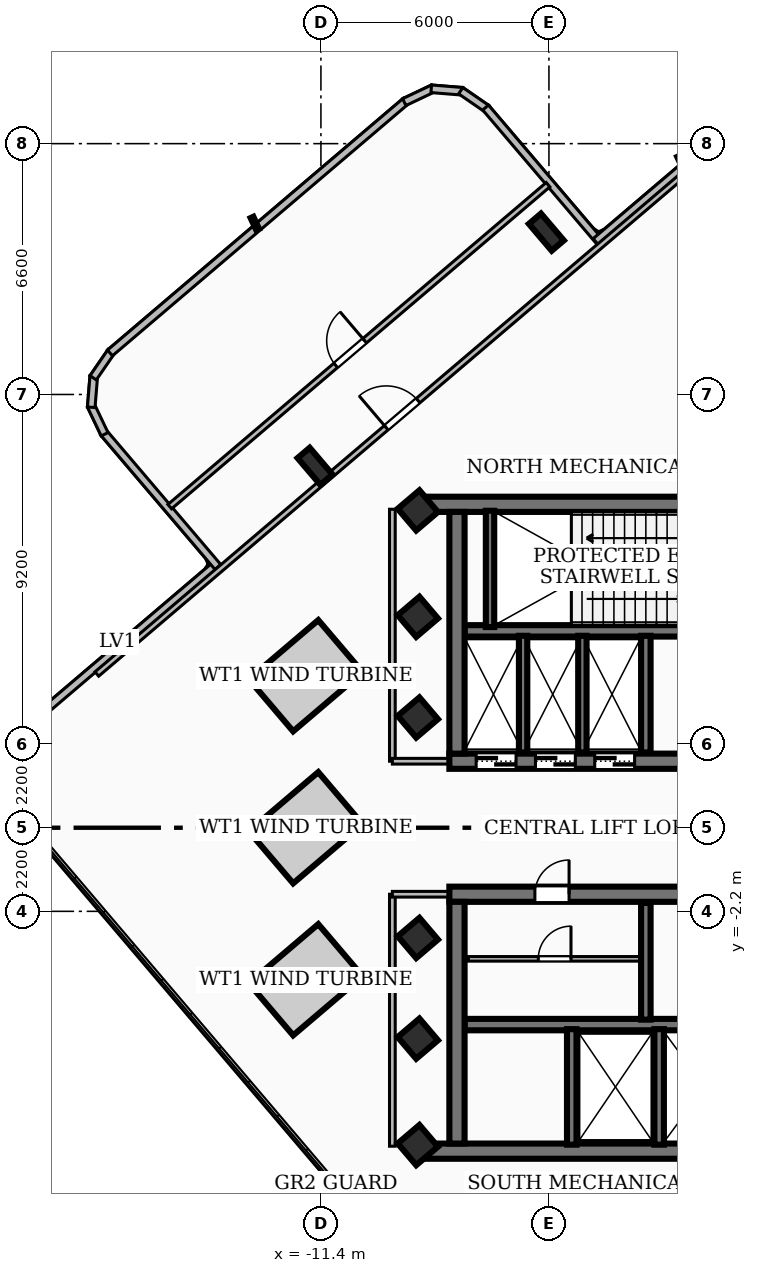
"""IFC4 building model, lengths in metres.
Left out: names, types, materials, properties, quantities, classifications, styles, units other than length and angle.
Written with IfcOpenShell. Run it as: python <this file> out.ifc"""

import sys

from ifc_helpers import new_model, si_unit, direction, frame, frame_2d, origin, origin_2d, place, context, subcontext, project, spatial, rectangle, hollow_rectangle, i_section, extrude, element, fill, save


model = new_model("IFC4")
c1 = context("Model", 3, precision=1e-05, world=origin(), true_north=direction((0.0, 1.0)))
c2 = subcontext(c1, "Body", "Model", "MODEL_VIEW")
j1 = project(units=[si_unit("LENGTHUNIT", "METRE"), si_unit("PLANEANGLEUNIT", "RADIAN")], contexts=[c1])
p1 = place(None, origin())
s1 = spatial("IfcSite", under=j1, at=p1, CompositionType="ELEMENT")
p2 = place(p1, origin())
s2 = spatial("IfcBuilding", under=s1, at=p2, CompositionType="ELEMENT")
p3 = place(p2, frame((0.0, 0.0, 239.4)))
s3 = spatial("IfcBuildingStorey", under=s2, at=p3, CompositionType="ELEMENT", Elevation=239.4)
p4 = place(p3, frame((-8.78, 8.51, 0.0), z_axis=(0.0, 0.0, 1.0), x_axis=(1.0, 0.0, 0.0)))
e1 = element("IfcWall", 1, at=p4, inside=s3, PredefinedType="SHEAR", context=c2, shape_type="SweptSolid", body=[
    extrude(rectangle(XDim=17.56, YDim=0.4, at=frame_2d((8.78, 0.0))), origin(), (0.0, 0.0, 1.0), 4.42),
])
p5 = place(p3, frame((8.02, 1.75, 0.0), z_axis=(0.0, 0.0, 1.0), x_axis=(-1.0, 0.0, 0.0)))
e2 = element("IfcWall", 2, at=p5, inside=s3, PredefinedType="SHEAR", context=c2, shape_type="SweptSolid", body=[
    extrude(rectangle(XDim=16.04, YDim=0.4, at=frame_2d((8.02, 0.0))), origin(), (0.0, 0.0, 1.0), 4.42),
])
p6 = place(p5, frame((7.45, 0.0, 0.0)))
e3 = element("IfcOpeningElement", 3, at=p6, cuts=e2, PredefinedType="OPENING", context=c2, shape_type="SweptSolid", body=[
    extrude(rectangle(XDim=1.0, YDim=2.1, at=frame_2d((0.5, 1.05))), frame((0.0, 0.21, 0.0), z_axis=(0.0, -1.0, 0.0), x_axis=(1.0, 0.0, 0.0)), (0.0, 0.0, 1.0), 0.42),
])
p7 = place(p5, frame((14.285, 0.0, 0.0)))
e4 = element("IfcOpeningElement", 4, at=p7, cuts=e2, PredefinedType="OPENING", context=c2, shape_type="SweptSolid", body=[
    extrude(rectangle(XDim=1.05, YDim=2.15, at=frame_2d((0.525, 1.075))), frame((0.0, 0.21, 0.0), z_axis=(0.0, -1.0, 0.0), x_axis=(1.0, 0.0, 0.0)), (0.0, 0.0, 1.0), 0.42),
])
p8 = place(p5, frame((12.725, 0.0, 0.0)))
e5 = element("IfcOpeningElement", 5, at=p8, cuts=e2, PredefinedType="OPENING", context=c2, shape_type="SweptSolid", body=[
    extrude(rectangle(XDim=1.05, YDim=2.15, at=frame_2d((0.525, 1.075))), frame((0.0, 0.21, 0.0), z_axis=(0.0, -1.0, 0.0), x_axis=(1.0, 0.0, 0.0)), (0.0, 0.0, 1.0), 0.42),
])
p9 = place(p5, frame((11.165, 0.0, 0.0)))
e6 = element("IfcOpeningElement", 6, at=p9, cuts=e2, PredefinedType="OPENING", context=c2, shape_type="SweptSolid", body=[
    extrude(rectangle(XDim=1.05, YDim=2.15, at=frame_2d((0.525, 1.075))), frame((0.0, 0.21, 0.0), z_axis=(0.0, -1.0, 0.0), x_axis=(1.0, 0.0, 0.0)), (0.0, 0.0, 1.0), 0.42),
])
p10 = place(p5, frame((3.85, 0.0, 0.0)))
e7 = element("IfcOpeningElement", 7, at=p10, cuts=e2, PredefinedType="OPENING", context=c2, shape_type="SweptSolid", body=[
    extrude(rectangle(XDim=0.9, YDim=2.06, at=frame_2d((0.45, 1.03))), frame((0.0, 0.21, 0.0), z_axis=(0.0, -1.0, 0.0), x_axis=(1.0, 0.0, 0.0)), (0.0, 0.0, 1.0), 0.42),
])
p11 = place(p5, frame((2.35, 0.0, 0.0)))
e8 = element("IfcOpeningElement", 8, at=p11, cuts=e2, PredefinedType="OPENING", context=c2, shape_type="SweptSolid", body=[
    extrude(rectangle(XDim=0.9, YDim=2.06, at=frame_2d((0.45, 1.03))), frame((0.0, 0.21, 0.0), z_axis=(0.0, -1.0, 0.0), x_axis=(1.0, 0.0, 0.0)), (0.0, 0.0, 1.0), 0.42),
])
p12 = place(p5, frame((0.8, 0.0, 0.0)))
e9 = element("IfcOpeningElement", 9, at=p12, cuts=e2, PredefinedType="OPENING", context=c2, shape_type="SweptSolid", body=[
    extrude(rectangle(XDim=0.9, YDim=2.06, at=frame_2d((0.45, 1.03))), frame((0.0, 0.21, 0.0), z_axis=(0.0, -1.0, 0.0), x_axis=(1.0, 0.0, 0.0)), (0.0, 0.0, 1.0), 0.42),
])
p13 = place(p3, frame((-7.82, 1.95, 0.0), z_axis=(0.0, 0.0, 1.0), x_axis=(0.0, 1.0, 0.0)))
e10 = element("IfcWall", 10, at=p13, inside=s3, PredefinedType="SHEAR", context=c2, shape_type="SweptSolid", body=[
    extrude(rectangle(XDim=6.36, YDim=0.4, at=frame_2d((3.18, 0.0))), origin(), (0.0, 0.0, 1.0), 4.42),
])
p14 = place(p3, frame((7.62, 5.18, 0.0), z_axis=(0.0, 0.0, 1.0), x_axis=(-1.0, 0.0, 0.0)))
e11 = element("IfcWall", 11, at=p14, inside=s3, PredefinedType="SOLIDWALL", context=c2, shape_type="SweptSolid", body=[
    extrude(rectangle(XDim=15.24, YDim=0.3, at=frame_2d((7.62, 0.0))), origin(), (0.0, 0.0, 1.0), 4.42),
])
p15 = place(p14, frame((5.77, 0.0, 0.0)))
e12 = element("IfcOpeningElement", 12, at=p15, cuts=e11, PredefinedType="OPENING", context=c2, shape_type="SweptSolid", body=[
    extrude(rectangle(XDim=1.1, YDim=2.15, at=frame_2d((0.55, 1.075))), frame((0.0, 0.16, 0.0), z_axis=(0.0, -1.0, 0.0), x_axis=(1.0, 0.0, 0.0)), (0.0, 0.0, 1.0), 0.32),
])
p16 = place(p14, frame((2.97, 0.0, 0.0)))
e13 = element("IfcOpeningElement", 13, at=p16, cuts=e11, PredefinedType="OPENING", context=c2, shape_type="SweptSolid", body=[
    extrude(rectangle(XDim=1.1, YDim=2.15, at=frame_2d((0.55, 1.075))), frame((0.0, 0.16, 0.0), z_axis=(0.0, -1.0, 0.0), x_axis=(1.0, 0.0, 0.0)), (0.0, 0.0, 1.0), 0.32),
])
p17 = place(p14, frame((7.97, 0.0, 0.0)))
e14 = element("IfcOpeningElement", 14, at=p17, cuts=e11, PredefinedType="OPENING", context=c2, shape_type="SweptSolid", body=[
    extrude(rectangle(XDim=1.0, YDim=2.1, at=frame_2d((0.5, 1.05))), frame((0.0, 0.16, 0.0), z_axis=(0.0, -1.0, 0.0), x_axis=(1.0, 0.0, 0.0)), (0.0, 0.0, 1.0), 0.32),
])
p18 = place(p3, frame((8.78, -8.51, 0.0), z_axis=(0.0, 0.0, 1.0), x_axis=(-1.0, 0.0, 0.0)))
e15 = element("IfcWall", 15, at=p18, inside=s3, PredefinedType="SHEAR", context=c2, shape_type="SweptSolid", body=[
    extrude(rectangle(XDim=17.56, YDim=0.4, at=frame_2d((8.78, 0.0))), origin(), (0.0, 0.0, 1.0), 4.42),
])
p19 = place(p3, frame((-8.02, -1.75, 0.0), z_axis=(0.0, 0.0, 1.0), x_axis=(1.0, 0.0, 0.0)))
e16 = element("IfcWall", 16, at=p19, inside=s3, PredefinedType="SHEAR", context=c2, shape_type="SweptSolid", body=[
    extrude(rectangle(XDim=16.04, YDim=0.4, at=frame_2d((8.02, 0.0))), origin(), (0.0, 0.0, 1.0), 4.42),
])
p20 = place(p19, frame((7.45, 0.0, 0.0)))
e17 = element("IfcOpeningElement", 17, at=p20, cuts=e16, PredefinedType="OPENING", context=c2, shape_type="SweptSolid", body=[
    extrude(rectangle(XDim=1.0, YDim=2.1, at=frame_2d((0.5, 1.05))), frame((0.0, 0.21, 0.0), z_axis=(0.0, -1.0, 0.0), x_axis=(1.0, 0.0, 0.0)), (0.0, 0.0, 1.0), 0.42),
])
p21 = place(p19, frame((12.65, 0.0, 0.0)))
e18 = element("IfcOpeningElement", 18, at=p21, cuts=e16, PredefinedType="OPENING", context=c2, shape_type="SweptSolid", body=[
    extrude(rectangle(XDim=0.9, YDim=2.06, at=frame_2d((0.45, 1.03))), frame((0.0, 0.21, 0.0), z_axis=(0.0, -1.0, 0.0), x_axis=(1.0, 0.0, 0.0)), (0.0, 0.0, 1.0), 0.42),
])
p22 = place(p19, frame((2.25, 0.0, 0.0)))
e19 = element("IfcOpeningElement", 19, at=p22, cuts=e16, PredefinedType="OPENING", context=c2, shape_type="SweptSolid", body=[
    extrude(rectangle(XDim=0.9, YDim=2.06, at=frame_2d((0.45, 1.03))), frame((0.0, 0.21, 0.0), z_axis=(0.0, -1.0, 0.0), x_axis=(1.0, 0.0, 0.0)), (0.0, 0.0, 1.0), 0.42),
])
p23 = place(p3, frame((-7.82, -8.31, 0.0), z_axis=(0.0, 0.0, 1.0), x_axis=(0.0, 1.0, 0.0)))
e20 = element("IfcWall", 20, at=p23, inside=s3, PredefinedType="SHEAR", context=c2, shape_type="SweptSolid", body=[
    extrude(rectangle(XDim=6.36, YDim=0.4, at=frame_2d((3.18, 0.0))), origin(), (0.0, 0.0, 1.0), 4.42),
])
p24 = place(p3, frame((-7.62, -5.18, 0.0), z_axis=(0.0, 0.0, 1.0), x_axis=(1.0, 0.0, 0.0)))
e21 = element("IfcWall", 21, at=p24, inside=s3, PredefinedType="SOLIDWALL", context=c2, shape_type="SweptSolid", body=[
    extrude(rectangle(XDim=15.24, YDim=0.3, at=frame_2d((7.62, 0.0))), origin(), (0.0, 0.0, 1.0), 4.42),
])
p25 = place(p24, frame((5.77, 0.0, 0.0)))
e22 = element("IfcOpeningElement", 22, at=p25, cuts=e21, PredefinedType="OPENING", context=c2, shape_type="SweptSolid", body=[
    extrude(rectangle(XDim=1.1, YDim=2.15, at=frame_2d((0.55, 1.075))), frame((0.0, 0.16, 0.0), z_axis=(0.0, -1.0, 0.0), x_axis=(1.0, 0.0, 0.0)), (0.0, 0.0, 1.0), 0.32),
])
p26 = place(p24, frame((7.97, 0.0, 0.0)))
e23 = element("IfcOpeningElement", 23, at=p26, cuts=e21, PredefinedType="OPENING", context=c2, shape_type="SweptSolid", body=[
    extrude(rectangle(XDim=1.0, YDim=2.1, at=frame_2d((0.5, 1.05))), frame((0.0, 0.16, 0.0), z_axis=(0.0, -1.0, 0.0), x_axis=(1.0, 0.0, 0.0)), (0.0, 0.0, 1.0), 0.32),
])
p27 = place(p3, frame((-6.95, 5.28, 0.0), z_axis=(0.0, 0.0, 1.0), x_axis=(0.0, 1.0, 0.0)))
e24 = element("IfcWall", 24, at=p27, inside=s3, PredefinedType="SOLIDWALL", context=c2, shape_type="SweptSolid", body=[
    extrude(rectangle(XDim=3.06, YDim=0.22, at=frame_2d((1.53, 0.0))), origin(), (0.0, 0.0, 1.0), 4.42),
])
p28 = place(p3, frame((-2.85, 1.98, 0.0), z_axis=(0.0, 0.0, 1.0), x_axis=(0.0, 1.0, 0.0)))
e25 = element("IfcWall", 25, at=p28, inside=s3, PredefinedType="SOLIDWALL", context=c2, shape_type="SweptSolid", body=[
    extrude(rectangle(XDim=3.07, YDim=0.25, at=frame_2d((1.535, 0.0))), origin(), (0.0, 0.0, 1.0), 4.42),
])
for number, where, z_axis, x_axis in (
    (26, (-2.5, -8.34, 0.0), (0.0, 0.0, 1.0), (0.0, 1.0, 0.0)),
    (27, (-4.8, -8.34, 0.0), (0.0, 0.0, 1.0), (0.0, 1.0, 0.0)),
):
    element("IfcWall", number, at=place(p3, frame(where, z_axis=z_axis, x_axis=x_axis)), inside=s3, PredefinedType="SOLIDWALL", context=c2, shape_type="SweptSolid", body=[
        extrude(rectangle(XDim=3.04, YDim=0.25, at=frame_2d((1.52, 0.0))), origin(), (0.0, 0.0, 1.0), 4.42),
    ])
p29 = place(p3, frame((-2.85, -5.05, 0.0), z_axis=(0.0, 0.0, 1.0), x_axis=(0.0, 1.0, 0.0)))
e28 = element("IfcWall", 28, at=p29, inside=s3, PredefinedType="SOLIDWALL", context=c2, shape_type="SweptSolid", body=[
    extrude(rectangle(XDim=3.07, YDim=0.25, at=frame_2d((1.535, 0.0))), origin(), (0.0, 0.0, 1.0), 4.42),
])
for number, where, z_axis, x_axis in (
    (29, (-6.08, 1.98, 0.0), (0.0, 0.0, 1.0), (0.0, 1.0, 0.0)),
    (30, (-4.52, 1.98, 0.0), (0.0, 0.0, 1.0), (0.0, 1.0, 0.0)),
):
    element("IfcWall", number, at=place(p3, frame(where, z_axis=z_axis, x_axis=x_axis)), inside=s3, PredefinedType="SOLIDWALL", context=c2, shape_type="SweptSolid", body=[
        extrude(rectangle(XDim=3.07, YDim=0.22, at=frame_2d((1.535, 0.0))), origin(), (0.0, 0.0, 1.0), 4.42),
    ])
for number, where, z_axis, x_axis in (
    (31, (-8.85, -5.55, 0.0), (0.0, 0.0, 1.0), (0.762, 0.648, 0.0)),
    (32, (-8.85, -2.9, 0.0), (0.0, 0.0, 1.0), (0.762, 0.648, 0.0)),
    (33, (-8.85, 2.9, 0.0), (0.0, 0.0, 1.0), (0.762, 0.648, 0.0)),
    (34, (-8.85, 5.55, 0.0), (0.0, 0.0, 1.0), (0.762, 0.648, 0.0)),
    (35, (-8.85, 8.35, 0.0), (0.0, 0.0, 1.0), (0.762, 0.648, 0.0)),
    (36, (-8.85, -8.35, 0.0), (0.0, 0.0, 1.0), (0.762, 0.648, 0.0)),
):
    element("IfcColumn", number, at=place(p3, frame(where, z_axis=z_axis, x_axis=x_axis)), inside=s3, PredefinedType="COLUMN", context=c2, shape_type="SweptSolid", body=[
        extrude(rectangle(XDim=0.75, YDim=0.75, at=origin_2d()), origin(), (0.0, 0.0, 1.0), 4.68),
    ])
for number, where, z_axis, x_axis in (
    (37, (-5.468, 15.671, 0.0), (0.0, 0.0, 1.0), (0.762, 0.648, 0.0)),
    (38, (-11.554, 9.51, 0.0), (0.0, 0.0, 1.0), (0.762, 0.648, 0.0)),
):
    element("IfcColumn", number, at=place(p3, frame(where, z_axis=z_axis, x_axis=x_axis)), inside=s3, PredefinedType="COLUMN", context=c2, shape_type="SweptSolid", body=[
        extrude(i_section(OverallWidth=0.418, OverallDepth=0.927, WebThickness=0.019, FlangeThickness=0.032, at=origin_2d()), origin(), (0.0, 0.0, 1.0), 4.68),
    ])
for number, where, z_axis, x_axis in (
    (39, (-11.8, -4.0, 0.0), (0.0, 0.0, 1.0), (0.762, 0.648, 0.0)),
    (40, (-11.8, 0.0, 0.0), (0.0, 0.0, 1.0), (0.762, 0.648, 0.0)),
    (41, (-11.8, 4.0, 0.0), (0.0, 0.0, 1.0), (0.762, 0.648, 0.0)),
):
    element("IfcColumn", number, at=place(p3, frame(where, z_axis=z_axis, x_axis=x_axis)), inside=s3, PredefinedType="COLUMN", context=c2, shape_type="SweptSolid", body=[
        extrude(hollow_rectangle(XDim=0.3, YDim=0.3, WallThickness=0.016, at=origin_2d()), origin(), (0.0, 0.0, 1.0), 1.6),
    ])
p30 = place(p3, frame((-19.236, 2.604, 0.0), z_axis=(0.0, 0.0, 1.0), x_axis=(0.761575518431, 0.648076175867, 0.0)))
e42 = element("IfcWall", 42, at=p30, inside=s3, PredefinedType="SOLIDWALL", context=c2, shape_type="SweptSolid", body=[
    extrude(rectangle(XDim=6.741, YDim=0.2, at=frame_2d((3.371, 0.0))), origin(), (0.0, 0.0, 1.0), 4.42),
])
p31 = place(p3, frame((-14.111, 6.86, 0.0), z_axis=(0.0, 0.0, 1.0), x_axis=(-0.648040740079, 0.761605671721, 0.0)))
e43 = element("IfcWall", 43, at=p31, inside=s3, PredefinedType="SOLIDWALL", context=c2, shape_type="SweptSolid", body=[
    extrude(rectangle(XDim=4.641, YDim=0.2, at=frame_2d((2.321, 0.0))), origin(), (0.0, 0.0, 1.0), 4.42),
])
p32 = place(p3, frame((-17.092, 10.353, 0.0), z_axis=(0.0, 0.0, 1.0), x_axis=(-0.42979812108, 0.902925010793, 0.0)))
e44 = element("IfcWall", 44, at=p32, inside=s3, PredefinedType="SOLIDWALL", context=c2, shape_type="SweptSolid", body=[
    extrude(rectangle(XDim=0.84, YDim=0.2, at=frame_2d((0.42, 0.0))), origin(), (0.0, 0.0, 1.0), 4.42),
])
p33 = place(p3, frame((-17.444, 11.063, 0.0), z_axis=(0.0, 0.0, 1.0), x_axis=(0.081404017248, 0.996681185724, 0.0)))
e45 = element("IfcWall", 45, at=p33, inside=s3, PredefinedType="SOLIDWALL", context=c2, shape_type="SweptSolid", body=[
    extrude(rectangle(XDim=0.825, YDim=0.2, at=frame_2d((0.412, 0.0))), origin(), (0.0, 0.0, 1.0), 4.42),
])
p34 = place(p3, frame((-17.393, 11.839, 0.0), z_axis=(0.0, 0.0, 1.0), x_axis=(0.566602962866, 0.823990948052, 0.0)))
e46 = element("IfcWall", 46, at=p34, inside=s3, PredefinedType="SOLIDWALL", context=c2, shape_type="SweptSolid", body=[
    extrude(rectangle(XDim=0.839, YDim=0.2, at=frame_2d((0.419, 0.0))), origin(), (0.0, 0.0, 1.0), 4.42),
])
p35 = place(p3, frame((-16.951, 12.493, 0.0), z_axis=(0.0, 0.0, 1.0), x_axis=(0.761554435907, 0.648100949814, 0.0)))
e47 = element("IfcWall", 47, at=p35, inside=s3, PredefinedType="SOLIDWALL", context=c2, shape_type="SweptSolid", body=[
    extrude(rectangle(XDim=10.224, YDim=0.2, at=frame_2d((5.112, 0.0))), origin(), (0.0, 0.0, 1.0), 4.42),
])
p36 = place(p3, frame((-9.207, 19.092, 0.0), z_axis=(0.0, 0.0, 1.0), x_axis=(0.903376142734, 0.428849093201, 0.0)))
e48 = element("IfcWall", 48, at=p36, inside=s3, PredefinedType="SOLIDWALL", context=c2, shape_type="SweptSolid", body=[
    extrude(rectangle(XDim=0.839, YDim=0.2, at=frame_2d((0.419, 0.0))), origin(), (0.0, 0.0, 1.0), 4.42),
])
p37 = place(p3, frame((-8.497, 19.443, 0.0), z_axis=(0.0, 0.0, 1.0), x_axis=(0.996776567966, -0.080227635853, 0.0)))
e49 = element("IfcWall", 49, at=p37, inside=s3, PredefinedType="SOLIDWALL", context=c2, shape_type="SweptSolid", body=[
    extrude(rectangle(XDim=0.825, YDim=0.2, at=frame_2d((0.412, 0.0))), origin(), (0.0, 0.0, 1.0), 4.42),
])
p38 = place(p3, frame((-7.721, 19.393, 0.0), z_axis=(0.0, 0.0, 1.0), x_axis=(0.823447180448, -0.567392933524, 0.0)))
e50 = element("IfcWall", 50, at=p38, inside=s3, PredefinedType="SOLIDWALL", context=c2, shape_type="SweptSolid", body=[
    extrude(rectangle(XDim=0.839, YDim=0.2, at=frame_2d((0.419, 0.0))), origin(), (0.0, 0.0, 1.0), 4.42),
])
p39 = place(p3, frame((-7.067, 18.95, 0.0), z_axis=(0.0, 0.0, 1.0), x_axis=(0.648040740079, -0.761605671721, 0.0)))
e51 = element("IfcWall", 51, at=p39, inside=s3, PredefinedType="SOLIDWALL", context=c2, shape_type="SweptSolid", body=[
    extrude(rectangle(XDim=4.641, YDim=0.2, at=frame_2d((2.321, 0.0))), origin(), (0.0, 0.0, 1.0), 2.212),
])
p40 = place(p3, frame((-4.172, 15.424, 0.0), z_axis=(0.0, 0.0, 1.0), x_axis=(0.761580290689, 0.648070567789, 0.0)))
e52 = element("IfcWall", 52, at=p40, inside=s3, PredefinedType="SOLIDWALL", context=c2, shape_type="SweptSolid", body=[
    extrude(rectangle(XDim=6.143, YDim=0.2, at=frame_2d((3.071, 0.0))), origin(), (0.0, 0.0, 1.0), 2.212),
])
p41 = place(p3, frame((-7.52, -3.45, 0.0), z_axis=(0.0, 0.0, 1.0), x_axis=(1.0, 0.0, 0.0)))
e53 = element("IfcWall", 53, at=p41, inside=s3, PredefinedType="PARTITIONING", context=c2, shape_type="SweptSolid", body=[
    extrude(rectangle(XDim=4.54, YDim=0.12, at=frame_2d((2.27, 0.0))), origin(), (0.0, 0.0, 1.0), 4.42),
])
p42 = place(p41, frame((1.84, 0.0, 0.0)))
e54 = element("IfcOpeningElement", 54, at=p42, cuts=e53, PredefinedType="OPENING", context=c2, shape_type="SweptSolid", body=[
    extrude(rectangle(XDim=0.86, YDim=2.04, at=frame_2d((0.43, 1.02))), frame((0.0, 0.07, 0.0), z_axis=(0.0, -1.0, 0.0), x_axis=(1.0, 0.0, 0.0)), (0.0, 0.0, 1.0), 0.14),
])
p43 = place(p3, frame((-9.52, 1.75, 0.0), z_axis=(0.0, 0.0, 1.0), x_axis=(0.0, 1.0, 0.0)))
e55 = element("IfcWall", 55, at=p43, inside=s3, PredefinedType="PARTITIONING", context=c2, shape_type="SweptSolid", body=[
    extrude(rectangle(XDim=6.63, YDim=0.15, at=frame_2d((3.315, 0.0))), origin(), (0.0, 0.0, 1.0), 2.212),
])
p44 = place(p3, frame((-7.85, 1.75, 0.0), z_axis=(0.0, 0.0, 1.0), x_axis=(-1.0, 0.0, 0.0)))
e56 = element("IfcWall", 56, at=p44, inside=s3, PredefinedType="PARTITIONING", context=c2, shape_type="SweptSolid", body=[
    extrude(rectangle(XDim=1.67, YDim=0.15, at=frame_2d((0.835, 0.0))), origin(), (0.0, 0.0, 1.0), 3.65),
])
p45 = place(p3, frame((-9.52, -8.38, 0.0), z_axis=(0.0, 0.0, 1.0), x_axis=(0.0, 1.0, 0.0)))
e57 = element("IfcWall", 57, at=p45, inside=s3, PredefinedType="PARTITIONING", context=c2, shape_type="SweptSolid", body=[
    extrude(rectangle(XDim=6.63, YDim=0.15, at=frame_2d((3.315, 0.0))), origin(), (0.0, 0.0, 1.0), 4.42),
])
p46 = place(p3, frame((-7.85, -1.75, 0.0), z_axis=(0.0, 0.0, 1.0), x_axis=(-1.0, 0.0, 0.0)))
e58 = element("IfcWall", 58, at=p46, inside=s3, PredefinedType="PARTITIONING", context=c2, shape_type="SweptSolid", body=[
    extrude(rectangle(XDim=1.67, YDim=0.15, at=frame_2d((0.835, 0.0))), origin(), (0.0, 0.0, 1.0), 3.65),
])
p47 = place(p3, frame((-17.296, 4.045, 0.0), z_axis=(0.0, 0.0, 1.0), x_axis=(0.761551896035, 0.648103934292, 0.0)))
e59 = element("IfcWall", 59, at=p47, inside=s3, PredefinedType="PARTITIONING", context=c2, shape_type="SweptSolid", body=[
    extrude(rectangle(XDim=20.5, YDim=0.15, at=frame_2d((10.25, 0.0))), origin(), (0.0, 0.0, 1.0), 2.212),
])
p48 = place(p47, frame((9.999, 0.0, 0.0)))
e60 = element("IfcOpeningElement", 60, at=p48, cuts=e59, PredefinedType="OPENING", context=c2, shape_type="SweptSolid", body=[
    extrude(rectangle(XDim=1.1, YDim=2.15, at=frame_2d((0.55, 1.075))), frame((0.0, 0.085, 0.0), z_axis=(0.0, -1.0, 0.0), x_axis=(1.0, 0.0, 0.0)), (0.0, 0.0, 1.0), 0.17),
])
p49 = place(p3, frame((-15.378, 8.449, 0.0), z_axis=(0.0, 0.0, 1.0), x_axis=(0.761592155386, 0.648056624729, 0.0)))
e61 = element("IfcWall", 61, at=p49, inside=s3, PredefinedType="PARTITIONING", context=c2, shape_type="SweptSolid", body=[
    extrude(rectangle(XDim=13.07, YDim=0.15, at=frame_2d((6.535, 0.0))), origin(), (0.0, 0.0, 1.0), 2.212),
])
p50 = place(p49, frame((5.735, 0.0, 0.0)))
e62 = element("IfcOpeningElement", 62, at=p50, cuts=e61, PredefinedType="OPENING", context=c2, shape_type="SweptSolid", body=[
    extrude(rectangle(XDim=1.0, YDim=2.1, at=frame_2d((0.5, 1.05))), frame((0.0, 0.085, 0.0), z_axis=(0.0, -1.0, 0.0), x_axis=(1.0, 0.0, 0.0)), (0.0, 0.0, 1.0), 0.17),
])
p51 = place(p7, origin())
e63 = element("IfcDoor", 63, at=p51, inside=s3, OperationType="DOUBLE_DOOR_SLIDING", PredefinedType="DOOR", context=c2, shape_type="SweptSolid", body=[
    extrude(rectangle(XDim=1.05, YDim=2.15, at=frame_2d((0.525, 1.075))), frame((0.0, 0.025, 0.0), z_axis=(0.0, -1.0, 0.0), x_axis=(1.0, 0.0, 0.0)), (0.0, 0.0, 1.0), 0.05),
])
fill(e4, e63)
p52 = place(p8, origin())
e64 = element("IfcDoor", 64, at=p52, inside=s3, OperationType="DOUBLE_DOOR_SLIDING", PredefinedType="DOOR", context=c2, shape_type="SweptSolid", body=[
    extrude(rectangle(XDim=1.05, YDim=2.15, at=frame_2d((0.525, 1.075))), frame((0.0, 0.025, 0.0), z_axis=(0.0, -1.0, 0.0), x_axis=(1.0, 0.0, 0.0)), (0.0, 0.0, 1.0), 0.05),
])
fill(e5, e64)
p53 = place(p9, origin())
e65 = element("IfcDoor", 65, at=p53, inside=s3, OperationType="DOUBLE_DOOR_SLIDING", PredefinedType="DOOR", context=c2, shape_type="SweptSolid", body=[
    extrude(rectangle(XDim=1.05, YDim=2.15, at=frame_2d((0.525, 1.075))), frame((0.0, 0.025, 0.0), z_axis=(0.0, -1.0, 0.0), x_axis=(1.0, 0.0, 0.0)), (0.0, 0.0, 1.0), 0.05),
])
fill(e6, e65)
p54 = place(p22, origin())
e66 = element("IfcDoor", 66, at=p54, inside=s3, OperationType="SINGLE_SWING_RIGHT", PredefinedType="DOOR", context=c2, shape_type="SweptSolid", body=[
    extrude(rectangle(XDim=0.9, YDim=2.06, at=frame_2d((0.45, 1.03))), frame((0.0, 0.025, 0.0), z_axis=(0.0, -1.0, 0.0), x_axis=(1.0, 0.0, 0.0)), (0.0, 0.0, 1.0), 0.05),
])
fill(e19, e66)
p55 = place(p42, origin())
e67 = element("IfcDoor", 67, at=p55, inside=s3, OperationType="SINGLE_SWING_RIGHT", PredefinedType="DOOR", context=c2, shape_type="SweptSolid", body=[
    extrude(rectangle(XDim=0.86, YDim=2.04, at=frame_2d((0.43, 1.02))), frame((0.0, 0.025, 0.0), z_axis=(0.0, -1.0, 0.0), x_axis=(1.0, 0.0, 0.0)), (0.0, 0.0, 1.0), 0.05),
])
fill(e54, e67)
p56 = place(p48, origin())
e68 = element("IfcDoor", 68, at=p56, inside=s3, OperationType="SINGLE_SWING_LEFT", PredefinedType="DOOR", context=c2, shape_type="SweptSolid", body=[
    extrude(rectangle(XDim=1.1, YDim=2.15, at=frame_2d((0.55, 1.075))), frame((0.0, 0.025, 0.0), z_axis=(0.0, -1.0, 0.0), x_axis=(1.0, 0.0, 0.0)), (0.0, 0.0, 1.0), 0.05),
])
fill(e60, e68)
p57 = place(p50, origin())
e69 = element("IfcDoor", 69, at=p57, inside=s3, OperationType="SINGLE_SWING_RIGHT", PredefinedType="DOOR", context=c2, shape_type="SweptSolid", body=[
    extrude(rectangle(XDim=1.0, YDim=2.1, at=frame_2d((0.5, 1.05))), frame((0.0, 0.025, 0.0), z_axis=(0.0, -1.0, 0.0), x_axis=(1.0, 0.0, 0.0)), (0.0, 0.0, 1.0), 0.05),
])
fill(e62, e69)
save(model, sys.argv[1])
